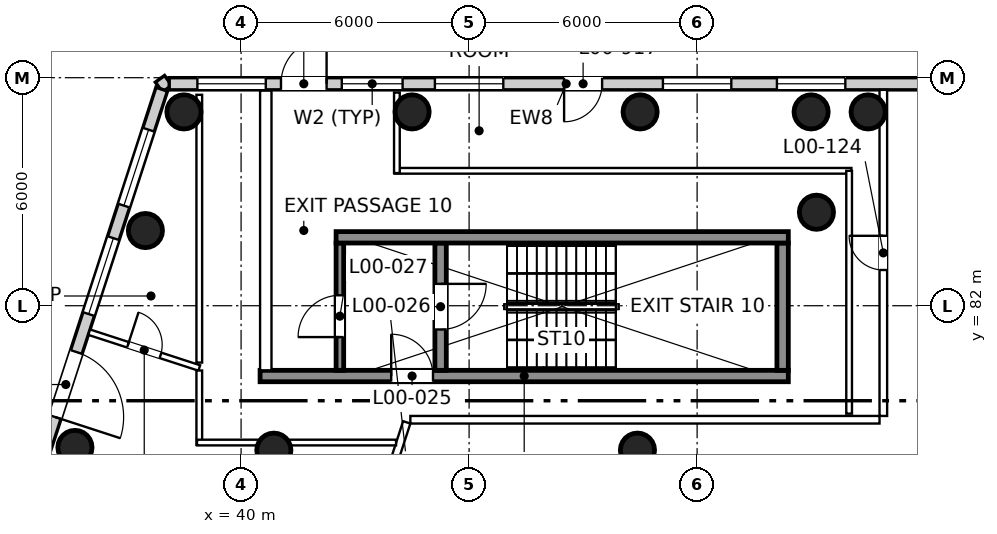
"""IFC4 building model, lengths in metres.
Left out: names, types, materials, properties, quantities, classifications, styles, units other than length and angle.
Written with IfcOpenShell. Run it as: python <this file> out.ifc"""

import sys

from ifc_helpers import new_model, si_unit, direction, frame, frame_2d, origin, origin_2d, place, context, subcontext, project, spatial, rectangle, circle, extrude, element, fill, save


model = new_model("IFC4")
c1 = context("Model", 3, precision=1e-05, world=origin(), true_north=direction((0.0, 1.0)))
c2 = subcontext(c1, "Body", "Model", "MODEL_VIEW")
j1 = project(units=[si_unit("LENGTHUNIT", "METRE"), si_unit("PLANEANGLEUNIT", "RADIAN")], contexts=[c1])
p1 = place(None, origin())
s1 = spatial("IfcSite", under=j1, at=p1, CompositionType="ELEMENT")
p2 = place(p1, origin())
s2 = spatial("IfcBuilding", under=s1, at=p2, CompositionType="ELEMENT")
p3 = place(p2, origin())
s3 = spatial("IfcBuildingStorey", under=s2, at=p3, CompositionType="ELEMENT", Elevation=0.0)
for number, where, z_axis, x_axis in (
    (1, (55.14, 84.46, 0.0), (0.0, 0.0, 1.0), (1.0, 0.0, 0.0)),
    (2, (50.43, 78.2, 0.0), (0.0, 0.0, 1.0), (1.0, 0.0, 0.0)),
    (3, (56.5, 87.1, 0.0), (0.0, 0.0, 1.0), (1.0, 0.0, 0.0)),
    (4, (50.5, 87.1, 0.0), (0.0, 0.0, 1.0), (1.0, 0.0, 0.0)),
    (5, (44.5, 87.1, 0.0), (0.0, 0.0, 1.0), (1.0, 0.0, 0.0)),
    (6, (38.496, 87.1, 0.0), (0.0, 0.0, 1.0), (1.0, 0.0, 0.0)),
    (7, (37.482, 83.978, 0.0), (0.0, 0.0, 1.0), (1.0, 0.0, 0.0)),
    (8, (35.628, 78.271, 0.0), (0.0, 0.0, 1.0), (1.0, 0.0, 0.0)),
    (9, (40.862, 78.199, 0.0), (0.0, 0.0, 1.0), (1.0, 0.0, 0.0)),
    (10, (55.0, 87.1, 0.0), (0.0, 0.0, 1.0), (1.0, 0.0, 0.0)),
):
    element("IfcColumn", number, at=place(p3, frame(where, z_axis=z_axis, x_axis=x_axis)), inside=s3, PredefinedType="COLUMN", context=c2, shape_type="SweptSolid", body=[
        extrude(circle(Radius=0.45, at=origin_2d()), origin(), (0.0, 0.0, 1.0), 9.0),
    ])
p4 = place(p3, frame((38.08, 87.928, 0.0), z_axis=(0.0, 0.0, 1.0), x_axis=(-0.809087927272, -0.587687609145, 0.0)))
e11 = element("IfcWall", 11, at=p4, inside=s3, PredefinedType="SOLIDWALL", context=c2, shape_type="SweptSolid", body=[
    extrude(rectangle(XDim=0.3, YDim=0.32, at=frame_2d((0.15, 0.0))), origin(), (0.0, 0.0, 1.0), 8.65),
])
p5 = place(p3, frame((59.0, 87.84, 0.0), z_axis=(0.0, 0.0, 1.0), x_axis=(-1.0, 0.0, 0.0)))
e12 = element("IfcWall", 12, at=p5, inside=s3, PredefinedType="SOLIDWALL", context=c2, shape_type="SweptSolid", body=[
    extrude(rectangle(XDim=20.891, YDim=0.32, at=frame_2d((10.446, 0.0))), origin(), (0.0, 0.0, 1.0), 8.65),
])
p6 = place(p5, frame((3.1, 0.0, 0.9)))
e13 = element("IfcOpeningElement", 13, at=p6, cuts=e12, PredefinedType="OPENING", context=c2, shape_type="SweptSolid", body=[
    extrude(rectangle(XDim=1.8, YDim=2.1, at=frame_2d((0.9, 1.05))), frame((0.0, 0.17, 0.0), z_axis=(0.0, -1.0, 0.0), x_axis=(1.0, 0.0, 0.0)), (0.0, 0.0, 1.0), 0.34),
])
p7 = place(p5, frame((6.1, 0.0, 0.9)))
e14 = element("IfcOpeningElement", 14, at=p7, cuts=e12, PredefinedType="OPENING", context=c2, shape_type="SweptSolid", body=[
    extrude(rectangle(XDim=1.8, YDim=2.1, at=frame_2d((0.9, 1.05))), frame((0.0, 0.17, 0.0), z_axis=(0.0, -1.0, 0.0), x_axis=(1.0, 0.0, 0.0)), (0.0, 0.0, 1.0), 0.34),
])
p8 = place(p5, frame((9.5, 0.0, 0.0)))
e15 = element("IfcOpeningElement", 15, at=p8, cuts=e12, PredefinedType="OPENING", context=c2, shape_type="SweptSolid", body=[
    extrude(rectangle(XDim=1.0, YDim=2.1, at=frame_2d((0.5, 1.05))), frame((0.0, 0.17, 0.0), z_axis=(0.0, -1.0, 0.0), x_axis=(1.0, 0.0, 0.0)), (0.0, 0.0, 1.0), 0.34),
])
p9 = place(p5, frame((12.1, 0.0, 0.9)))
e16 = element("IfcOpeningElement", 16, at=p9, cuts=e12, PredefinedType="OPENING", context=c2, shape_type="SweptSolid", body=[
    extrude(rectangle(XDim=1.8, YDim=2.1, at=frame_2d((0.9, 1.05))), frame((0.0, 0.17, 0.0), z_axis=(0.0, -1.0, 0.0), x_axis=(1.0, 0.0, 0.0)), (0.0, 0.0, 1.0), 0.34),
])
p10 = place(p5, frame((14.75, 0.0, 0.9)))
e17 = element("IfcOpeningElement", 17, at=p10, cuts=e12, PredefinedType="OPENING", context=c2, shape_type="SweptSolid", body=[
    extrude(rectangle(XDim=1.6, YDim=1.8, at=frame_2d((0.8, 0.9))), frame((0.0, 0.17, 0.0), z_axis=(0.0, -1.0, 0.0), x_axis=(1.0, 0.0, 0.0)), (0.0, 0.0, 1.0), 0.34),
])
p11 = place(p5, frame((18.35, 0.0, 0.9)))
e18 = element("IfcOpeningElement", 18, at=p11, cuts=e12, PredefinedType="OPENING", context=c2, shape_type="SweptSolid", body=[
    extrude(rectangle(XDim=1.8, YDim=2.1, at=frame_2d((0.9, 1.05))), frame((0.0, 0.17, 0.0), z_axis=(0.0, -1.0, 0.0), x_axis=(1.0, 0.0, 0.0)), (0.0, 0.0, 1.0), 0.34),
])
p12 = place(p5, frame((16.75, 0.0, 0.0)))
e19 = element("IfcOpeningElement", 19, at=p12, cuts=e12, PredefinedType="OPENING", context=c2, shape_type="SweptSolid", body=[
    extrude(rectangle(XDim=1.2, YDim=2.1, at=frame_2d((0.6, 1.05))), frame((0.0, 0.17, 0.0), z_axis=(0.0, -1.0, 0.0), x_axis=(1.0, 0.0, 0.0)), (0.0, 0.0, 1.0), 0.34),
])
p13 = place(p3, frame((37.912, 87.697, 0.0), z_axis=(0.0, 0.0, 1.0), x_axis=(-0.309016476183, -0.951056684666, 0.0)))
e20 = element("IfcWall", 20, at=p13, inside=s3, PredefinedType="SOLIDWALL", context=c2, shape_type="SweptSolid", body=[
    extrude(rectangle(XDim=28.556, YDim=0.32, at=frame_2d((14.278, 0.0))), origin(), (0.0, 0.0, 1.0), 8.65),
])
p14 = place(p13, frame((1.121, 0.0, 0.9)))
e21 = element("IfcOpeningElement", 21, at=p14, cuts=e20, PredefinedType="OPENING", context=c2, shape_type="SweptSolid", body=[
    extrude(rectangle(XDim=2.1, YDim=3.0, at=frame_2d((1.05, 1.5))), frame((0.0, 0.17, 0.0), z_axis=(0.0, -1.0, 0.0), x_axis=(1.0, 0.0, 0.0)), (0.0, 0.0, 1.0), 0.34),
])
p15 = place(p13, frame((4.121, 0.0, 0.9)))
e22 = element("IfcOpeningElement", 22, at=p15, cuts=e20, PredefinedType="OPENING", context=c2, shape_type="SweptSolid", body=[
    extrude(rectangle(XDim=2.1, YDim=3.0, at=frame_2d((1.05, 1.5))), frame((0.0, 0.17, 0.0), z_axis=(0.0, -1.0, 0.0), x_axis=(1.0, 0.0, 0.0)), (0.0, 0.0, 1.0), 0.34),
])
p16 = place(p13, frame((7.271, 0.0, 0.0)))
e23 = element("IfcOpeningElement", 23, at=p16, cuts=e20, PredefinedType="OPENING", context=c2, shape_type="SweptSolid", body=[
    extrude(rectangle(XDim=1.8, YDim=2.4, at=frame_2d((0.9, 1.2))), frame((0.0, 0.17, 0.0), z_axis=(0.0, -1.0, 0.0), x_axis=(1.0, 0.0, 0.0)), (0.0, 0.0, 1.0), 0.34),
])
p17 = place(p13, frame((10.121, 0.0, 0.9)))
e24 = element("IfcOpeningElement", 24, at=p17, cuts=e20, PredefinedType="OPENING", context=c2, shape_type="SweptSolid", body=[
    extrude(rectangle(XDim=2.1, YDim=3.0, at=frame_2d((1.05, 1.5))), frame((0.0, 0.17, 0.0), z_axis=(0.0, -1.0, 0.0), x_axis=(1.0, 0.0, 0.0)), (0.0, 0.0, 1.0), 0.34),
])
p18 = place(p13, frame((13.121, 0.0, 0.9)))
e25 = element("IfcOpeningElement", 25, at=p18, cuts=e20, PredefinedType="OPENING", context=c2, shape_type="SweptSolid", body=[
    extrude(rectangle(XDim=2.1, YDim=3.0, at=frame_2d((1.05, 1.5))), frame((0.0, 0.17, 0.0), z_axis=(0.0, -1.0, 0.0), x_axis=(1.0, 0.0, 0.0)), (0.0, 0.0, 1.0), 0.34),
])
p19 = place(p13, frame((16.121, 0.0, 0.9)))
e26 = element("IfcOpeningElement", 26, at=p19, cuts=e20, PredefinedType="OPENING", context=c2, shape_type="SweptSolid", body=[
    extrude(rectangle(XDim=2.1, YDim=3.0, at=frame_2d((1.05, 1.5))), frame((0.0, 0.17, 0.0), z_axis=(0.0, -1.0, 0.0), x_axis=(1.0, 0.0, 0.0)), (0.0, 0.0, 1.0), 0.34),
])
p20 = place(p13, frame((19.271, 0.0, 0.0)))
e27 = element("IfcOpeningElement", 27, at=p20, cuts=e20, PredefinedType="OPENING", context=c2, shape_type="SweptSolid", body=[
    extrude(rectangle(XDim=1.8, YDim=2.4, at=frame_2d((0.9, 1.2))), frame((0.0, 0.17, 0.0), z_axis=(0.0, -1.0, 0.0), x_axis=(1.0, 0.0, 0.0)), (0.0, 0.0, 1.0), 0.34),
])
p21 = place(p13, frame((22.121, 0.0, 0.9)))
e28 = element("IfcOpeningElement", 28, at=p21, cuts=e20, PredefinedType="OPENING", context=c2, shape_type="SweptSolid", body=[
    extrude(rectangle(XDim=2.1, YDim=3.0, at=frame_2d((1.05, 1.5))), frame((0.0, 0.17, 0.0), z_axis=(0.0, -1.0, 0.0), x_axis=(1.0, 0.0, 0.0)), (0.0, 0.0, 1.0), 0.34),
])
p22 = place(p13, frame((25.121, 0.0, 0.9)))
e29 = element("IfcOpeningElement", 29, at=p22, cuts=e20, PredefinedType="OPENING", context=c2, shape_type="SweptSolid", body=[
    extrude(rectangle(XDim=2.1, YDim=3.0, at=frame_2d((1.05, 1.5))), frame((0.0, 0.17, 0.0), z_axis=(0.0, -1.0, 0.0), x_axis=(1.0, 0.0, 0.0)), (0.0, 0.0, 1.0), 0.34),
])
p23 = place(p3, frame((40.5, 80.15, 0.0), z_axis=(0.0, 0.0, 1.0), x_axis=(1.0, 0.0, 0.0)))
e30 = element("IfcWall", 30, at=p23, inside=s3, PredefinedType="SHEAR", context=c2, shape_type="SweptSolid", body=[
    extrude(rectangle(XDim=13.9, YDim=0.3, at=frame_2d((6.95, 0.0))), origin(), (0.0, 0.0, 1.0), 9.0),
])
p24 = place(p23, frame((3.45, 0.0, 0.0)))
e31 = element("IfcOpeningElement", 31, at=p24, cuts=e30, PredefinedType="OPENING", context=c2, shape_type="SweptSolid", body=[
    extrude(rectangle(XDim=1.1, YDim=2.1, at=frame_2d((0.55, 1.05))), frame((0.0, 0.16, 0.0), z_axis=(0.0, -1.0, 0.0), x_axis=(1.0, 0.0, 0.0)), (0.0, 0.0, 1.0), 0.32),
])
p25 = place(p3, frame((40.65, 80.3, 0.0), z_axis=(0.0, 0.0, 1.0), x_axis=(0.0, 1.0, 0.0)))
e32 = element("IfcWall", 32, at=p25, inside=s3, PredefinedType="PARTITIONING", context=c2, shape_type="SweptSolid", body=[
    extrude(rectangle(XDim=7.36, YDim=0.3, at=frame_2d((3.68, 0.0))), origin(), (0.0, 0.0, 1.0), 7.95),
])
p26 = place(p3, frame((42.6, 80.3, 0.0), z_axis=(0.0, 0.0, 1.0), x_axis=(0.0, 1.0, 0.0)))
e33 = element("IfcWall", 33, at=p26, inside=s3, PredefinedType="SHEAR", context=c2, shape_type="SweptSolid", body=[
    extrude(rectangle(XDim=3.35, YDim=0.2, at=frame_2d((1.675, 0.0))), origin(), (0.0, 0.0, 1.0), 9.0),
])
p27 = place(p26, frame((0.875, 0.0, 0.0)))
e34 = element("IfcOpeningElement", 34, at=p27, cuts=e33, PredefinedType="OPENING", context=c2, shape_type="SweptSolid", body=[
    extrude(rectangle(XDim=1.1, YDim=2.1, at=frame_2d((0.55, 1.05))), frame((0.0, 0.11, 0.0), z_axis=(0.0, -1.0, 0.0), x_axis=(1.0, 0.0, 0.0)), (0.0, 0.0, 1.0), 0.22),
])
p28 = place(p3, frame((45.25, 80.3, 0.0), z_axis=(0.0, 0.0, 1.0), x_axis=(0.0, 1.0, 0.0)))
e35 = element("IfcWall", 35, at=p28, inside=s3, PredefinedType="SHEAR", context=c2, shape_type="SweptSolid", body=[
    extrude(rectangle(XDim=3.35, YDim=0.3, at=frame_2d((1.675, 0.0))), origin(), (0.0, 0.0, 1.0), 9.0),
])
p29 = place(p28, frame((1.075, 0.0, 0.0)))
e36 = element("IfcOpeningElement", 36, at=p29, cuts=e35, PredefinedType="OPENING", context=c2, shape_type="SweptSolid", body=[
    extrude(rectangle(XDim=1.2, YDim=2.1, at=frame_2d((0.6, 1.05))), frame((0.0, 0.16, 0.0), z_axis=(0.0, -1.0, 0.0), x_axis=(1.0, 0.0, 0.0)), (0.0, 0.0, 1.0), 0.32),
])
p30 = place(p3, frame((54.25, 80.3, 0.0), z_axis=(0.0, 0.0, 1.0), x_axis=(0.0, 1.0, 0.0)))
e37 = element("IfcWall", 37, at=p30, inside=s3, PredefinedType="SHEAR", context=c2, shape_type="SweptSolid", body=[
    extrude(rectangle(XDim=3.35, YDim=0.3, at=frame_2d((1.675, 0.0))), origin(), (0.0, 0.0, 1.0), 9.0),
])
p31 = place(p3, frame((42.5, 83.8, 0.0), z_axis=(0.0, 0.0, 1.0), x_axis=(1.0, 0.0, 0.0)))
e38 = element("IfcWall", 38, at=p31, inside=s3, PredefinedType="SHEAR", context=c2, shape_type="SweptSolid", body=[
    extrude(rectangle(XDim=11.9, YDim=0.3, at=frame_2d((5.95, 0.0))), origin(), (0.0, 0.0, 1.0), 9.0),
])
p32 = place(p3, frame((38.884, 62.081, 0.0), z_axis=(0.0, 0.0, 1.0), x_axis=(0.309013160516, 0.951057761983, 0.0)))
e39 = element("IfcWall", 39, at=p32, inside=s3, PredefinedType="PARTITIONING", context=c2, shape_type="SweptSolid", body=[
    extrude(rectangle(XDim=17.717, YDim=0.2, at=frame_2d((8.859, 0.0))), origin(), (0.0, 0.0, 1.0), 8.65),
])
p33 = place(p32, frame((13.242, 0.0, 0.0)))
e40 = element("IfcOpeningElement", 40, at=p33, cuts=e39, PredefinedType="OPENING", context=c2, shape_type="SweptSolid", body=[
    extrude(rectangle(XDim=0.9, YDim=2.1, at=frame_2d((0.45, 1.05))), frame((0.0, 0.11, 0.0), z_axis=(0.0, -1.0, 0.0), x_axis=(1.0, 0.0, 0.0)), (0.0, 0.0, 1.0), 0.22),
])
p34 = place(p32, frame((7.242, 0.0, 0.0)))
e41 = element("IfcOpeningElement", 41, at=p34, cuts=e39, PredefinedType="OPENING", context=c2, shape_type="SweptSolid", body=[
    extrude(rectangle(XDim=0.9, YDim=2.1, at=frame_2d((0.45, 1.05))), frame((0.0, 0.11, 0.0), z_axis=(0.0, -1.0, 0.0), x_axis=(1.0, 0.0, 0.0)), (0.0, 0.0, 1.0), 0.22),
])
p35 = place(p32, frame((3.83, 0.0, 0.0)))
e42 = element("IfcOpeningElement", 42, at=p35, cuts=e39, PredefinedType="OPENING", context=c2, shape_type="SweptSolid", body=[
    extrude(rectangle(XDim=0.9, YDim=2.1, at=frame_2d((0.45, 1.05))), frame((0.0, 0.11, 0.0), z_axis=(0.0, -1.0, 0.0), x_axis=(1.0, 0.0, 0.0)), (0.0, 0.0, 1.0), 0.22),
])
p36 = place(p3, frame((44.454, 79.0, 0.0), z_axis=(0.0, 0.0, 1.0), x_axis=(1.0, 0.0, 0.0)))
e43 = element("IfcWall", 43, at=p36, inside=s3, PredefinedType="PARTITIONING", context=c2, shape_type="SweptSolid", body=[
    extrude(rectangle(XDim=12.346, YDim=0.2, at=frame_2d((6.173, 0.0))), origin(), (0.0, 0.0, 1.0), 7.95),
])
p37 = place(p3, frame((56.9, 79.1, 0.0), z_axis=(0.0, 0.0, 1.0), x_axis=(0.0, 1.0, 0.0)))
e44 = element("IfcWall", 44, at=p37, inside=s3, PredefinedType="PARTITIONING", context=c2, shape_type="SweptSolid", body=[
    extrude(rectangle(XDim=8.58, YDim=0.2, at=frame_2d((4.29, 0.0))), origin(), (0.0, 0.0, 1.0), 7.95),
])
p38 = place(p37, frame((3.84, 0.0, 0.0)))
e45 = element("IfcOpeningElement", 45, at=p38, cuts=e44, PredefinedType="OPENING", context=c2, shape_type="SweptSolid", body=[
    extrude(rectangle(XDim=0.9, YDim=2.1, at=frame_2d((0.45, 1.05))), frame((0.0, 0.11, 0.0), z_axis=(0.0, -1.0, 0.0), x_axis=(1.0, 0.0, 0.0)), (0.0, 0.0, 1.0), 0.22),
])
p39 = place(p3, frame((36.003, 81.304, 0.0), z_axis=(0.0, 0.0, 1.0), x_axis=(0.951037013891, -0.309077010161, 0.0)))
e46 = element("IfcWall", 46, at=p39, inside=s3, PredefinedType="PARTITIONING", context=c2, shape_type="SweptSolid", body=[
    extrude(rectangle(XDim=3.046, YDim=0.15, at=frame_2d((1.523, 0.0))), origin(), (0.0, 0.0, 1.0), 7.95),
])
p40 = place(p39, frame((1.073, 0.0, 0.0)))
e47 = element("IfcOpeningElement", 47, at=p40, cuts=e46, PredefinedType="OPENING", context=c2, shape_type="SweptSolid", body=[
    extrude(rectangle(XDim=0.9, YDim=2.1, at=frame_2d((0.45, 1.05))), frame((0.0, 0.085, 0.0), z_axis=(0.0, -1.0, 0.0), x_axis=(1.0, 0.0, 0.0)), (0.0, 0.0, 1.0), 0.17),
])
p41 = place(p3, frame((38.9, 80.296, 0.0), z_axis=(0.0, 0.0, 1.0), x_axis=(0.0, -1.0, 0.0)))
e48 = element("IfcWall", 48, at=p41, inside=s3, PredefinedType="PARTITIONING", context=c2, shape_type="SweptSolid", body=[
    extrude(rectangle(XDim=1.956, YDim=0.15, at=frame_2d((0.978, 0.0))), origin(), (0.0, 0.0, 1.0), 8.65),
])
p42 = place(p3, frame((38.84, 78.4, 0.0), z_axis=(0.0, 0.0, 1.0), x_axis=(1.0, 0.0, 0.0)))
e49 = element("IfcWall", 49, at=p42, inside=s3, PredefinedType="PARTITIONING", context=c2, shape_type="SweptSolid", body=[
    extrude(rectangle(XDim=5.238, YDim=0.15, at=frame_2d((2.619, 0.0))), origin(), (0.0, 0.0, 1.0), 7.95),
])
p43 = place(p3, frame((38.9, 87.55, 0.0), z_axis=(0.0, 0.0, 1.0), x_axis=(0.0, -1.0, 0.0)))
e50 = element("IfcWall", 50, at=p43, inside=s3, PredefinedType="PARTITIONING", context=c2, shape_type="SweptSolid", body=[
    extrude(rectangle(XDim=7.046, YDim=0.15, at=frame_2d((3.523, 0.0))), origin(), (0.0, 0.0, 1.0), 8.65),
])
p44 = place(p3, frame((56.06, 85.55, 0.0), z_axis=(0.0, 0.0, 1.0), x_axis=(-1.0, 0.0, 0.0)))
e51 = element("IfcWall", 51, at=p44, inside=s3, PredefinedType="PARTITIONING", context=c2, shape_type="SweptSolid", body=[
    extrude(rectangle(XDim=12.02, YDim=0.15, at=frame_2d((6.01, 0.0))), origin(), (0.0, 0.0, 1.0), 7.95),
])
p45 = place(p3, frame((44.1, 85.49, 0.0), z_axis=(0.0, 0.0, 1.0), x_axis=(0.0, 1.0, 0.0)))
e52 = element("IfcWall", 52, at=p45, inside=s3, PredefinedType="PARTITIONING", context=c2, shape_type="SweptSolid", body=[
    extrude(rectangle(XDim=2.12, YDim=0.15, at=frame_2d((1.06, 0.0))), origin(), (0.0, 0.0, 1.0), 8.65),
])
p46 = place(p3, frame((56.0, 79.16, 0.0), z_axis=(0.0, 0.0, 1.0), x_axis=(0.0, 1.0, 0.0)))
e53 = element("IfcWall", 53, at=p46, inside=s3, PredefinedType="PARTITIONING", context=c2, shape_type="SweptSolid", body=[
    extrude(rectangle(XDim=6.39, YDim=0.15, at=frame_2d((3.195, 0.0))), origin(), (0.0, 0.0, 1.0), 8.65),
])
p47 = place(p6, origin())
e54 = element("IfcWindow", 54, at=p47, inside=s3, PartitioningType="SINGLE_PANEL", PredefinedType="WINDOW", context=c2, shape_type="SweptSolid", body=[
    extrude(rectangle(XDim=1.8, YDim=2.1, at=frame_2d((0.9, 1.05))), frame((0.0, 0.07, 0.0), z_axis=(0.0, -1.0, 0.0), x_axis=(1.0, 0.0, 0.0)), (0.0, 0.0, 1.0), 0.06),
])
fill(e13, e54)
p48 = place(p7, origin())
e55 = element("IfcWindow", 55, at=p48, inside=s3, PartitioningType="SINGLE_PANEL", PredefinedType="WINDOW", context=c2, shape_type="SweptSolid", body=[
    extrude(rectangle(XDim=1.8, YDim=2.1, at=frame_2d((0.9, 1.05))), frame((0.0, 0.07, 0.0), z_axis=(0.0, -1.0, 0.0), x_axis=(1.0, 0.0, 0.0)), (0.0, 0.0, 1.0), 0.06),
])
fill(e14, e55)
p49 = place(p8, origin())
e56 = element("IfcDoor", 56, at=p49, inside=s3, OperationType="SINGLE_SWING_RIGHT", PredefinedType="DOOR", context=c2, shape_type="SweptSolid", body=[
    extrude(rectangle(XDim=1.0, YDim=2.1, at=frame_2d((0.5, 1.05))), frame((0.0, 0.04, 0.0), z_axis=(0.0, -1.0, 0.0), x_axis=(1.0, 0.0, 0.0)), (0.0, 0.0, 1.0), 0.05),
])
fill(e15, e56)
p50 = place(p9, origin())
e57 = element("IfcWindow", 57, at=p50, inside=s3, PartitioningType="SINGLE_PANEL", PredefinedType="WINDOW", context=c2, shape_type="SweptSolid", body=[
    extrude(rectangle(XDim=1.8, YDim=2.1, at=frame_2d((0.9, 1.05))), frame((0.0, 0.07, 0.0), z_axis=(0.0, -1.0, 0.0), x_axis=(1.0, 0.0, 0.0)), (0.0, 0.0, 1.0), 0.06),
])
fill(e16, e57)
p51 = place(p10, origin())
e58 = element("IfcWindow", 58, at=p51, inside=s3, PartitioningType="SINGLE_PANEL", PredefinedType="WINDOW", context=c2, shape_type="SweptSolid", body=[
    extrude(rectangle(XDim=1.6, YDim=1.8, at=frame_2d((0.8, 0.9))), frame((0.0, 0.07, 0.0), z_axis=(0.0, -1.0, 0.0), x_axis=(1.0, 0.0, 0.0)), (0.0, 0.0, 1.0), 0.06),
])
fill(e17, e58)
p52 = place(p11, origin())
e59 = element("IfcWindow", 59, at=p52, inside=s3, PartitioningType="SINGLE_PANEL", PredefinedType="WINDOW", context=c2, shape_type="SweptSolid", body=[
    extrude(rectangle(XDim=1.8, YDim=2.1, at=frame_2d((0.9, 1.05))), frame((0.0, 0.07, 0.0), z_axis=(0.0, -1.0, 0.0), x_axis=(1.0, 0.0, 0.0)), (0.0, 0.0, 1.0), 0.06),
])
fill(e18, e59)
p53 = place(p14, origin())
e60 = element("IfcWindow", 60, at=p53, inside=s3, PartitioningType="SINGLE_PANEL", PredefinedType="WINDOW", context=c2, shape_type="SweptSolid", body=[
    extrude(rectangle(XDim=2.1, YDim=3.0, at=frame_2d((1.05, 1.5))), frame((0.0, 0.07, 0.0), z_axis=(0.0, -1.0, 0.0), x_axis=(1.0, 0.0, 0.0)), (0.0, 0.0, 1.0), 0.06),
])
fill(e21, e60)
p54 = place(p15, origin())
e61 = element("IfcWindow", 61, at=p54, inside=s3, PartitioningType="SINGLE_PANEL", PredefinedType="WINDOW", context=c2, shape_type="SweptSolid", body=[
    extrude(rectangle(XDim=2.1, YDim=3.0, at=frame_2d((1.05, 1.5))), frame((0.0, 0.07, 0.0), z_axis=(0.0, -1.0, 0.0), x_axis=(1.0, 0.0, 0.0)), (0.0, 0.0, 1.0), 0.06),
])
fill(e22, e61)
p55 = place(p16, origin())
e62 = element("IfcDoor", 62, at=p55, inside=s3, OperationType="DOUBLE_DOOR_DOUBLE_SWING", PredefinedType="DOOR", context=c2, shape_type="SweptSolid", body=[
    extrude(rectangle(XDim=1.8, YDim=2.4, at=frame_2d((0.9, 1.2))), frame((0.0, 0.04, 0.0), z_axis=(0.0, -1.0, 0.0), x_axis=(1.0, 0.0, 0.0)), (0.0, 0.0, 1.0), 0.05),
])
fill(e23, e62)
p56 = place(p12, frame((1.2, 0.0, 0.0), z_axis=(0.0, 0.0, 1.0), x_axis=(-1.0, 0.0, 0.0)))
e63 = element("IfcDoor", 63, at=p56, inside=s3, OperationType="SINGLE_SWING_RIGHT", PredefinedType="DOOR", context=c2, shape_type="SweptSolid", body=[
    extrude(rectangle(XDim=1.2, YDim=2.1, at=frame_2d((0.6, 1.05))), frame((0.0, 0.04, 0.0), z_axis=(0.0, -1.0, 0.0), x_axis=(1.0, 0.0, 0.0)), (0.0, 0.0, 1.0), 0.05),
])
fill(e19, e63)
p57 = place(p24, origin())
e64 = element("IfcDoor", 64, at=p57, inside=s3, OperationType="SINGLE_SWING_LEFT", PredefinedType="DOOR", context=c2, shape_type="SweptSolid", body=[
    extrude(rectangle(XDim=1.1, YDim=2.1, at=frame_2d((0.55, 1.05))), frame((0.0, 0.025, 0.0), z_axis=(0.0, -1.0, 0.0), x_axis=(1.0, 0.0, 0.0)), (0.0, 0.0, 1.0), 0.05),
])
fill(e31, e64)
p58 = place(p29, frame((1.2, 0.0, 0.0), z_axis=(0.0, 0.0, 1.0), x_axis=(-1.0, 0.0, 0.0)))
e65 = element("IfcDoor", 65, at=p58, inside=s3, OperationType="SINGLE_SWING_LEFT", PredefinedType="DOOR", context=c2, shape_type="SweptSolid", body=[
    extrude(rectangle(XDim=1.2, YDim=2.1, at=frame_2d((0.6, 1.05))), frame((0.0, 0.025, 0.0), z_axis=(0.0, -1.0, 0.0), x_axis=(1.0, 0.0, 0.0)), (0.0, 0.0, 1.0), 0.05),
])
fill(e36, e65)
p59 = place(p27, origin())
e66 = element("IfcDoor", 66, at=p59, inside=s3, OperationType="SINGLE_SWING_LEFT", PredefinedType="DOOR", context=c2, shape_type="SweptSolid", body=[
    extrude(rectangle(XDim=1.1, YDim=2.1, at=frame_2d((0.55, 1.05))), frame((0.0, 0.025, 0.0), z_axis=(0.0, -1.0, 0.0), x_axis=(1.0, 0.0, 0.0)), (0.0, 0.0, 1.0), 0.05),
])
fill(e34, e66)
p60 = place(p40, origin())
e67 = element("IfcDoor", 67, at=p60, inside=s3, OperationType="SINGLE_SWING_LEFT", PredefinedType="DOOR", context=c2, shape_type="SweptSolid", body=[
    extrude(rectangle(XDim=0.9, YDim=2.1, at=frame_2d((0.45, 1.05))), frame((0.0, 0.025, 0.0), z_axis=(0.0, -1.0, 0.0), x_axis=(1.0, 0.0, 0.0)), (0.0, 0.0, 1.0), 0.05),
])
fill(e47, e67)
p61 = place(p38, origin())
e68 = element("IfcDoor", 68, at=p61, inside=s3, OperationType="SINGLE_SWING_RIGHT", PredefinedType="DOOR", context=c2, shape_type="SweptSolid", body=[
    extrude(rectangle(XDim=0.9, YDim=2.1, at=frame_2d((0.45, 1.05))), frame((0.0, 0.025, 0.0), z_axis=(0.0, -1.0, 0.0), x_axis=(1.0, 0.0, 0.0)), (0.0, 0.0, 1.0), 0.05),
])
fill(e45, e68)
save(model, sys.argv[1])
